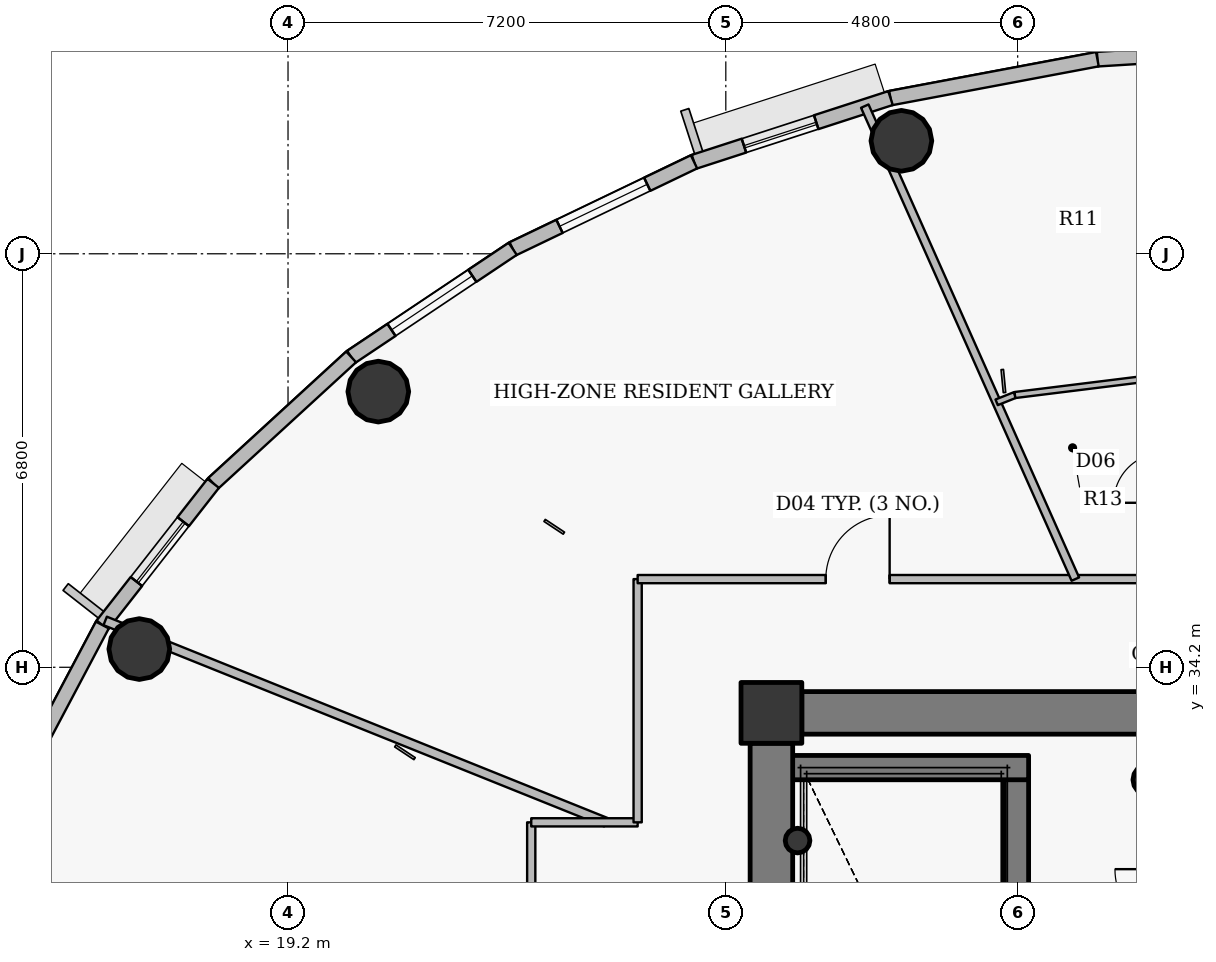
"""IFC4 building model, lengths in metres.
Left out: names, types, materials, properties, quantities, classifications, styles, units other than length and angle.
Written with IfcOpenShell. Run it as: python <this file> out.ifc"""

import sys

from ifc_helpers import new_model, si_unit, direction, frame, frame_2d, origin, origin_2d, place, context, subcontext, project, spatial, rectangle, hollow_circle, extrude, source, transform, mapped, element, fill, save


model = new_model("IFC4")
c1 = context("Model", 3, precision=1e-05, world=origin(), true_north=direction((0.0, 1.0)))
c2 = subcontext(c1, "Body", "Model", "MODEL_VIEW")
j1 = project(units=[si_unit("LENGTHUNIT", "METRE"), si_unit("PLANEANGLEUNIT", "RADIAN")], contexts=[c1])
p1 = place(None, origin())
s1 = spatial("IfcSite", under=j1, at=p1, CompositionType="ELEMENT")
p2 = place(p1, origin())
s2 = spatial("IfcBuilding", under=s1, at=p2, CompositionType="ELEMENT")
p3 = place(p2, frame((0.0, 0.0, 306.75)))
s3 = spatial("IfcBuildingStorey", under=s2, at=p3, CompositionType="ELEMENT", Elevation=306.75)
p4 = place(p3, frame((27.15, 33.45, 0.0), z_axis=(0.0, 0.0, 1.0), x_axis=(1.0, 0.0, 0.0)))
e1 = element("IfcColumn", 1, at=p4, inside=s3, PredefinedType="COLUMN", context=c2, shape_type="SweptSolid", body=[
    extrude(rectangle(XDim=1.0, YDim=1.0, at=origin_2d()), origin(), (0.0, 0.0, 1.0), 3.75),
])
p5 = place(p3, frame((33.35, 32.35, 0.0), z_axis=(0.0, 0.0, 1.0), x_axis=(1.0, 0.0, 0.0)))
e2 = element("IfcColumn", 2, at=p5, inside=s3, PredefinedType="COLUMN", context=c2, shape_type="SweptSolid", body=[
    extrude(hollow_circle(Radius=0.254, WallThickness=0.02, at=origin_2d()), origin(), (0.0, 0.0, 1.0), 3.75),
])
p6 = place(p3, frame((31.18, 27.8, 0.0), z_axis=(0.0, 0.0, 1.0), x_axis=(0.0, 1.0, 0.0)))
e3 = element("IfcWall", 3, at=p6, inside=s3, PredefinedType="SHEAR", context=c2, shape_type="SweptSolid", body=[
    extrude(rectangle(XDim=4.75, YDim=0.4, at=frame_2d((2.375, 0.0))), origin(), (0.0, 0.0, 1.0), 3.75),
])
p7 = place(p3, frame((27.25, 32.55, 0.0), z_axis=(0.0, 0.0, 1.0), x_axis=(1.0, 0.0, 0.0)))
e4 = element("IfcWall", 4, at=p7, inside=s3, PredefinedType="SHEAR", context=c2, shape_type="SweptSolid", body=[
    extrude(rectangle(XDim=4.13, YDim=0.4, at=frame_2d((2.065, 0.0))), origin(), (0.0, 0.0, 1.0), 3.75),
])
p8 = place(p3, frame((27.58, 31.35, 0.0), z_axis=(0.0, 0.0, 1.0), x_axis=(1.0, 0.0, 0.0)))
e5 = element("IfcColumn", 5, at=p8, inside=s3, PredefinedType="COLUMN", context=c2, shape_type="SweptSolid", body=[
    extrude(hollow_circle(Radius=0.203, WallThickness=0.016, at=origin_2d()), origin(), (0.0, 0.0, 1.0), 3.75),
])
p9 = place(p3, frame((27.65, 33.45, 0.0), z_axis=(0.0, 0.0, 1.0), x_axis=(1.0, 0.0, 0.0)))
e6 = element("IfcWall", 6, at=p9, inside=s3, PredefinedType="SHEAR", context=c2, shape_type="SweptSolid", body=[
    extrude(rectangle(XDim=16.7, YDim=0.7, at=frame_2d((8.35, 0.0))), origin(), (0.0, 0.0, 1.0), 3.05),
])
p10 = place(p9, frame((12.775, 0.0, 0.0)))
e7 = element("IfcOpeningElement", 7, at=p10, cuts=e6, PredefinedType="OPENING", context=c2, shape_type="SweptSolid", body=[
    extrude(rectangle(XDim=1.15, YDim=2.15, at=origin_2d()), frame((0.575, 0.36, 1.075), z_axis=(0.0, -1.0, 0.0), x_axis=(1.0, 0.0, 0.0)), (0.0, 0.0, 1.0), 0.72),
])
p11 = place(p3, frame((27.15, 21.05, 0.0), z_axis=(0.0, 0.0, 1.0), x_axis=(0.0, 1.0, 0.0)))
e8 = element("IfcWall", 8, at=p11, inside=s3, PredefinedType="SHEAR", context=c2, shape_type="SweptSolid", body=[
    extrude(rectangle(XDim=11.9, YDim=0.7, at=frame_2d((5.95, 0.0))), origin(), (0.0, 0.0, 1.0), 3.05),
])
for number, where, z_axis, x_axis in (
    (9, (29.288, 42.858, 0.0), (0.0, 0.0, 1.0), (1.0, 0.0, 0.0)),
    (10, (20.685, 38.733, 0.0), (0.0, 0.0, 1.0), (1.0, 0.0, 0.0)),
    (11, (16.754, 34.5, 0.0), (0.0, 0.0, 1.0), (1.0, 0.0, 0.0)),
):
    element("IfcColumn", number, at=place(p3, frame(where, z_axis=z_axis, x_axis=x_axis)), inside=s3, PredefinedType="COLUMN", context=c2, shape_type="SweptSolid", body=[
        extrude(hollow_circle(Radius=0.5, WallThickness=0.032, at=origin_2d()), origin(), (0.0, 0.0, 1.0), 3.75),
    ])
p12 = place(p3, frame((32.511, 44.2, 0.0), z_axis=(0.0, 0.0, 1.0), x_axis=(0.998104946479, 0.061534671648, 0.0)))
e12 = element("IfcWall", 12, at=p12, inside=s3, PredefinedType="SOLIDWALL", context=c2, shape_type="SweptSolid", body=[
    extrude(rectangle(XDim=3.495, YDim=0.24, at=frame_2d((1.748, 0.0))), origin(), (0.0, 0.0, 1.0), 3.5),
])
p13 = place(p12, frame((1.123, 0.0, 0.9)))
e13 = element("IfcOpeningElement", 13, at=p13, cuts=e12, PredefinedType="OPENING", context=c2, shape_type="SweptSolid", body=[
    extrude(rectangle(XDim=1.25, YDim=1.65, at=origin_2d()), frame((0.625, 0.13, 0.825), z_axis=(0.0, -1.0, 0.0), x_axis=(1.0, 0.0, 0.0)), (0.0, 0.0, 1.0), 0.26),
])
p14 = place(p3, frame((29.109, 43.56, 0.0), z_axis=(0.0, 0.0, 1.0), x_axis=(0.982782655757, 0.184765395959, 0.0)))
e14 = element("IfcWall", 14, at=p14, inside=s3, PredefinedType="SOLIDWALL", context=c2, shape_type="SweptSolid", body=[
    extrude(rectangle(XDim=3.462, YDim=0.24, at=frame_2d((1.731, 0.0))), origin(), (0.0, 0.0, 1.0), 3.5),
])
p15 = place(p3, frame((25.877, 42.512, 0.0), z_axis=(0.0, 0.0, 1.0), x_axis=(0.95123136723, 0.308478339592, 0.0)))
e15 = element("IfcWall", 15, at=p15, inside=s3, PredefinedType="SOLIDWALL", context=c2, shape_type="SweptSolid", body=[
    extrude(rectangle(XDim=3.398, YDim=0.24, at=frame_2d((1.699, 0.0))), origin(), (0.0, 0.0, 1.0), 3.5),
])
p16 = place(p15, frame((0.863, 0.0, 0.9)))
e16 = element("IfcOpeningElement", 16, at=p16, cuts=e15, PredefinedType="OPENING", context=c2, shape_type="SweptSolid", body=[
    extrude(rectangle(XDim=1.25, YDim=1.65, at=origin_2d()), frame((0.625, 0.13, 0.825), z_axis=(0.0, -1.0, 0.0), x_axis=(1.0, 0.0, 0.0)), (0.0, 0.0, 1.0), 0.26),
])
p17 = place(p3, frame((22.896, 41.082, 0.0), z_axis=(0.0, 0.0, 1.0), x_axis=(0.901573741254, 0.43262546051, 0.0)))
e17 = element("IfcWall", 17, at=p17, inside=s3, PredefinedType="SOLIDWALL", context=c2, shape_type="SweptSolid", body=[
    extrude(rectangle(XDim=3.307, YDim=0.24, at=frame_2d((1.653, 0.0))), origin(), (0.0, 0.0, 1.0), 3.5),
])
p18 = place(p17, frame((0.854, 0.0, 0.9)))
e18 = element("IfcOpeningElement", 18, at=p18, cuts=e17, PredefinedType="OPENING", context=c2, shape_type="SweptSolid", body=[
    extrude(rectangle(XDim=1.6, YDim=1.75, at=origin_2d()), frame((0.8, 0.13, 0.875), z_axis=(0.0, -1.0, 0.0), x_axis=(1.0, 0.0, 0.0)), (0.0, 0.0, 1.0), 0.26),
])
p19 = place(p3, frame((20.238, 39.304, 0.0), z_axis=(0.0, 0.0, 1.0), x_axis=(0.831250592635, 0.55589787933, 0.0)))
e19 = element("IfcWall", 19, at=p19, inside=s3, PredefinedType="SOLIDWALL", context=c2, shape_type="SweptSolid", body=[
    extrude(rectangle(XDim=3.197, YDim=0.24, at=frame_2d((1.599, 0.0))), origin(), (0.0, 0.0, 1.0), 3.5),
])
p20 = place(p19, frame((0.799, 0.0, 0.9)))
e20 = element("IfcOpeningElement", 20, at=p20, cuts=e19, PredefinedType="OPENING", context=c2, shape_type="SweptSolid", body=[
    extrude(rectangle(XDim=1.6, YDim=1.75, at=origin_2d()), frame((0.8, 0.13, 0.875), z_axis=(0.0, -1.0, 0.0), x_axis=(1.0, 0.0, 0.0)), (0.0, 0.0, 1.0), 0.26),
])
p21 = place(p3, frame((17.97, 37.225, 0.0), z_axis=(0.0, 0.0, 1.0), x_axis=(0.737068506972, 0.675818034703, 0.0)))
e21 = element("IfcWall", 21, at=p21, inside=s3, PredefinedType="SOLIDWALL", context=c2, shape_type="SweptSolid", body=[
    extrude(rectangle(XDim=3.077, YDim=0.24, at=frame_2d((1.539, 0.0))), origin(), (0.0, 0.0, 1.0), 3.5),
])
p22 = place(p3, frame((16.146, 34.895, 0.0), z_axis=(0.0, 0.0, 1.0), x_axis=(0.616337186556, 0.787482363275, 0.0)))
e22 = element("IfcWall", 22, at=p22, inside=s3, PredefinedType="SOLIDWALL", context=c2, shape_type="SweptSolid", body=[
    extrude(rectangle(XDim=2.958, YDim=0.24, at=frame_2d((1.479, 0.0))), origin(), (0.0, 0.0, 1.0), 3.5),
])
p23 = place(p22, frame((0.909, 0.0, 0.9)))
e23 = element("IfcOpeningElement", 23, at=p23, cuts=e22, PredefinedType="OPENING", context=c2, shape_type="SweptSolid", body=[
    extrude(rectangle(XDim=1.25, YDim=1.65, at=origin_2d()), frame((0.625, 0.13, 0.825), z_axis=(0.0, -1.0, 0.0), x_axis=(1.0, 0.0, 0.0)), (0.0, 0.0, 1.0), 0.26),
])
p24 = place(p3, frame((14.812, 32.372, 0.0), z_axis=(0.0, 0.0, 1.0), x_axis=(0.467628269026, 0.883925224218, 0.0)))
e24 = element("IfcWall", 24, at=p24, inside=s3, PredefinedType="SOLIDWALL", context=c2, shape_type="SweptSolid", body=[
    extrude(rectangle(XDim=2.854, YDim=0.24, at=frame_2d((1.427, 0.0))), origin(), (0.0, 0.0, 1.0), 3.5),
])
p25 = place(p3, frame((16.193, 34.962, 0.0), z_axis=(0.0, 0.0, 1.0), x_axis=(0.927839710722, -0.372979183343, 0.0)))
e25 = element("IfcWall", 25, at=p25, inside=s3, PredefinedType="PARTITIONING", context=c2, shape_type="SweptSolid", body=[
    extrude(rectangle(XDim=8.874, YDim=0.15, at=frame_2d((4.437, 0.0))), origin(), (0.0, 0.0, 1.0), 2.985),
])
p26 = place(p3, frame((23.2, 29.8, 0.0), z_axis=(0.0, 0.0, 1.0), x_axis=(0.0, 1.0, 0.0)))
e26 = element("IfcWall", 26, at=p26, inside=s3, PredefinedType="PARTITIONING", context=c2, shape_type="SweptSolid", body=[
    extrude(rectangle(XDim=1.85, YDim=0.135, at=frame_2d((0.925, 0.0))), origin(), (0.0, 0.0, 1.0), 3.5),
])
p27 = place(p3, frame((23.2, 31.65, 0.0), z_axis=(0.0, 0.0, 1.0), x_axis=(1.0, 0.0, 0.0)))
e27 = element("IfcWall", 27, at=p27, inside=s3, PredefinedType="PARTITIONING", context=c2, shape_type="SweptSolid", body=[
    extrude(rectangle(XDim=1.75, YDim=0.135, at=frame_2d((0.875, 0.0))), origin(), (0.0, 0.0, 1.0), 3.035),
])
p28 = place(p3, frame((24.95, 31.65, 0.0), z_axis=(0.0, 0.0, 1.0), x_axis=(0.0, 1.0, 0.0)))
e28 = element("IfcWall", 28, at=p28, inside=s3, PredefinedType="PARTITIONING", context=c2, shape_type="SweptSolid", body=[
    extrude(rectangle(XDim=4.0, YDim=0.135, at=frame_2d((2.0, 0.0))), origin(), (0.0, 0.0, 1.0), 3.035),
])
p29 = place(p3, frame((24.95, 35.65, 0.0), z_axis=(0.0, 0.0, 1.0), x_axis=(1.0, 0.0, 0.0)))
e29 = element("IfcWall", 29, at=p29, inside=s3, PredefinedType="PARTITIONING", context=c2, shape_type="SweptSolid", body=[
    extrude(rectangle(XDim=10.1, YDim=0.135, at=frame_2d((5.05, 0.0))), origin(), (0.0, 0.0, 1.0), 3.035),
])
p30 = place(p29, frame((3.094, 0.0, 0.0)))
e30 = element("IfcOpeningElement", 30, at=p30, cuts=e29, PredefinedType="OPENING", context=c2, shape_type="SweptSolid", body=[
    extrude(rectangle(XDim=1.05, YDim=2.15, at=origin_2d()), frame((0.525, 0.078, 1.075), z_axis=(0.0, -1.0, 0.0), x_axis=(1.0, 0.0, 0.0)), (0.0, 0.0, 1.0), 0.155),
])
p31 = place(p3, frame((28.686, 43.428, 0.0), z_axis=(0.0, 0.0, 1.0), x_axis=(0.406736980157, -0.913545307564, 0.0)))
e31 = element("IfcWall", 31, at=p31, inside=s3, PredefinedType="PARTITIONING", context=c2, shape_type="SweptSolid", body=[
    extrude(rectangle(XDim=8.514, YDim=0.135, at=frame_2d((4.257, 0.0))), origin(), (0.0, 0.0, 1.0), 3.035),
])
p32 = place(p3, frame((30.854, 38.557, 0.0), z_axis=(0.0, 0.0, 1.0), x_axis=(0.928996661722, 0.370088101011, 0.0)))
e32 = element("IfcWall", 32, at=p32, inside=s3, PredefinedType="PARTITIONING", context=c2, shape_type="SweptSolid", body=[
    extrude(rectangle(XDim=0.323, YDim=0.1, at=frame_2d((0.162, 0.0))), origin(), (0.0, 0.0, 1.0), 3.035),
])
p33 = place(p3, frame((31.155, 38.677, 0.0), z_axis=(0.0, 0.0, 1.0), x_axis=(0.99239360053, 0.123105408601, 0.0)))
e33 = element("IfcWall", 33, at=p33, inside=s3, PredefinedType="PARTITIONING", context=c2, shape_type="SweptSolid", body=[
    extrude(rectangle(XDim=4.883, YDim=0.1, at=frame_2d((2.441, 0.0))), origin(), (0.0, 0.0, 1.0), 2.985),
])
p34 = place(p33, frame((3.203, 0.0, 0.0)))
e34 = element("IfcOpeningElement", 34, at=p34, cuts=e33, PredefinedType="OPENING", context=c2, shape_type="SweptSolid", body=[
    extrude(rectangle(XDim=0.9, YDim=2.1, at=origin_2d()), frame((0.45, 0.06, 1.05), z_axis=(0.0, -1.0, 0.0), x_axis=(1.0, 0.0, 0.0)), (0.0, 0.0, 1.0), 0.12),
])
p35 = place(p3, frame((27.64, 33.8, 0.0), z_axis=(0.0, 0.0, 1.0), x_axis=(-1.0, 0.0, 0.0)))
e35 = element("IfcWall", 35, at=p35, inside=s3, PredefinedType="PARTITIONING", context=c2, shape_type="SweptSolid", body=[
    extrude(rectangle(XDim=0.84, YDim=0.135, at=frame_2d((0.42, 0.0))), origin(), (0.0, 0.0, 1.0), 3.035),
])
p36 = place(p3, frame((26.8, 33.492, 0.0), z_axis=(0.0, 0.0, 1.0), x_axis=(0.0, -1.0, 0.0)))
e36 = element("IfcWall", 36, at=p36, inside=s3, PredefinedType="PARTITIONING", context=c2, shape_type="SweptSolid", body=[
    extrude(rectangle(XDim=0.532, YDim=0.135, at=frame_2d((0.266, 0.0))), origin(), (0.0, 0.0, 1.0), 3.5),
])
m1 = source(origin(), c2, "Body", "SweptSolid", [
    extrude(rectangle(XDim=1.25, YDim=1.65, at=origin_2d()), frame((0.625, 0.03, 0.825), z_axis=(0.0, -1.0, 0.0), x_axis=(1.0, 0.0, 0.0)), (0.0, 0.0, 1.0), 0.06),
])
p37 = place(p16, origin())
e37 = element("IfcWindow", 37, at=p37, inside=s3, PartitioningType="SINGLE_PANEL", PredefinedType="WINDOW", context=c2, shape_type="MappedRepresentation", body=[
    mapped(m1, transform((0.0, 0.0, 0.0), x_axis=(1.0, 0.0, 0.0), y_axis=(0.0, 1.0, 0.0), z_axis=(0.0, 0.0, 1.0), scale=1.0)),
])
fill(e16, e37)
m2 = source(origin(), c2, "Body", "SweptSolid", [
    extrude(rectangle(XDim=1.6, YDim=1.75, at=origin_2d()), frame((0.8, 0.03, 0.875), z_axis=(0.0, -1.0, 0.0), x_axis=(1.0, 0.0, 0.0)), (0.0, 0.0, 1.0), 0.06),
])
p38 = place(p18, origin())
e38 = element("IfcWindow", 38, at=p38, inside=s3, PartitioningType="DOUBLE_PANEL_VERTICAL", PredefinedType="WINDOW", context=c2, shape_type="MappedRepresentation", body=[
    mapped(m2, transform((0.0, 0.0, 0.0), x_axis=(1.0, 0.0, 0.0), y_axis=(0.0, 1.0, 0.0), z_axis=(0.0, 0.0, 1.0), scale=1.0)),
])
fill(e18, e38)
p39 = place(p20, origin())
e39 = element("IfcWindow", 39, at=p39, inside=s3, PartitioningType="DOUBLE_PANEL_VERTICAL", PredefinedType="WINDOW", context=c2, shape_type="MappedRepresentation", body=[
    mapped(m2, transform((0.0, 0.0, 0.0), x_axis=(1.0, 0.0, 0.0), y_axis=(0.0, 1.0, 0.0), z_axis=(0.0, 0.0, 1.0), scale=1.0)),
])
fill(e20, e39)
p40 = place(p23, origin())
e40 = element("IfcWindow", 40, at=p40, inside=s3, PartitioningType="SINGLE_PANEL", PredefinedType="WINDOW", context=c2, shape_type="MappedRepresentation", body=[
    mapped(m1, transform((0.0, 0.0, 0.0), x_axis=(1.0, 0.0, 0.0), y_axis=(0.0, 1.0, 0.0), z_axis=(0.0, 0.0, 1.0), scale=1.0)),
])
fill(e23, e40)
m3 = source(origin(), c2, "Body", "SweptSolid", [
    extrude(rectangle(XDim=1.05, YDim=2.15, at=origin_2d()), frame((0.525, 0.025, 1.075), z_axis=(0.0, -1.0, 0.0), x_axis=(1.0, 0.0, 0.0)), (0.0, 0.0, 1.0), 0.05),
])
p41 = place(p30, origin())
e41 = element("IfcDoor", 41, at=p41, inside=s3, OperationType="SINGLE_SWING_RIGHT", PredefinedType="DOOR", context=c2, shape_type="MappedRepresentation", body=[
    mapped(m3, transform((0.0, 0.0, 0.0), x_axis=(1.0, 0.0, 0.0), y_axis=(0.0, 1.0, 0.0), z_axis=(0.0, 0.0, 1.0), scale=1.0)),
])
fill(e30, e41)
save(model, sys.argv[1])
